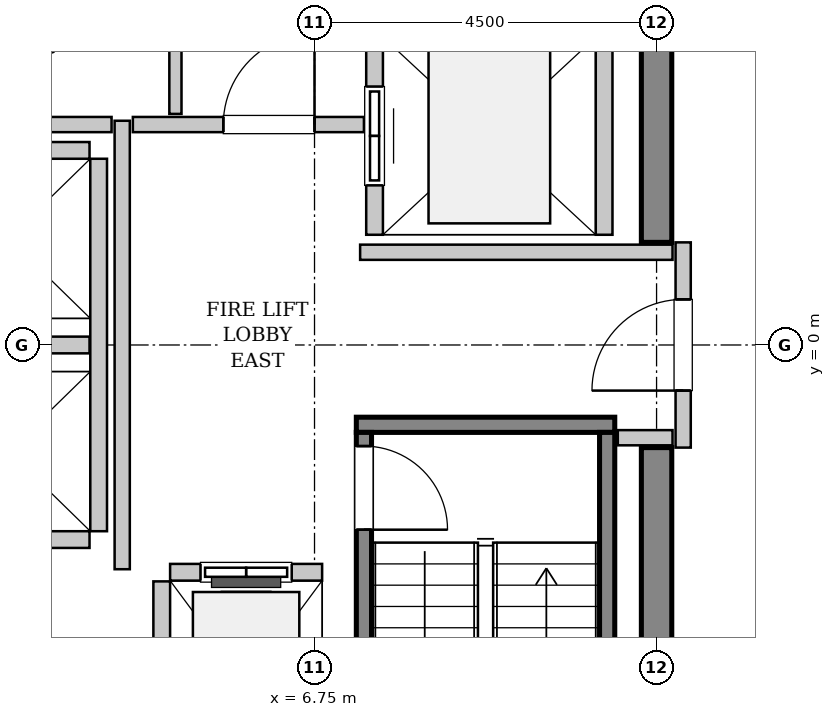
"""IFC4 building model, lengths in metres.
Left out: names, types, materials, properties, quantities, classifications, styles, units other than length and angle.
Written with IfcOpenShell. Run it as: python <this file> out.ifc"""

import sys

from ifc_helpers import new_model, si_unit, direction, frame, frame_2d, origin, place, context, subcontext, project, spatial, rectangle, extrude, source, transform, mapped, element, fill, save


model = new_model("IFC4")
c1 = context("Model", 3, precision=1e-05, world=origin(), true_north=direction((0.0, 1.0)))
c2 = subcontext(c1, "Body", "Model", "MODEL_VIEW")
j1 = project(units=[si_unit("LENGTHUNIT", "METRE"), si_unit("PLANEANGLEUNIT", "RADIAN")], contexts=[c1])
p1 = place(None, origin())
s1 = spatial("IfcSite", under=j1, at=p1, CompositionType="ELEMENT")
p2 = place(p1, origin())
s2 = spatial("IfcBuilding", under=s1, at=p2, CompositionType="ELEMENT")
p3 = place(p2, frame((0.0, 0.0, 330.0)))
s3 = spatial("IfcBuildingStorey", under=s2, at=p3, CompositionType="ELEMENT", Elevation=330.0)
m1 = source(origin(), c2, "Body", "SweptSolid", [
    extrude(rectangle(XDim=7.45, YDim=0.4, at=frame_2d((3.725, 0.0))), origin(), (0.0, 0.0, 1.0), 3.8),
])
for number, where, z_axis, x_axis in (
    (1, (11.25, -8.8, 0.0), (0.0, 0.0, 1.0), (0.0, 1.0, 0.0)),
    (2, (11.25, 1.35, 0.0), (0.0, 0.0, 1.0), (0.0, 1.0, 0.0)),
):
    element("IfcWall", number, at=place(p3, frame(where, z_axis=z_axis, x_axis=x_axis)), inside=s3, PredefinedType="SHEAR", context=c2, shape_type="MappedRepresentation", body=[
        mapped(m1, transform((0.0, 0.0, 0.0), x_axis=(1.0, 0.0, 0.0), y_axis=(0.0, 1.0, 0.0), z_axis=(0.0, 0.0, 1.0), scale=1.0)),
    ])
m2 = source(origin(), c2, "Body", "SweptSolid", [
    extrude(rectangle(XDim=3.4, YDim=0.2, at=frame_2d((1.7, 0.0))), origin(), (0.0, 0.0, 1.0), 3.8),
])
p4 = place(p3, frame((7.3, -1.05, 0.0), z_axis=(0.0, 0.0, 1.0), x_axis=(1.0, 0.0, 0.0)))
e3 = element("IfcWall", 3, at=p4, inside=s3, PredefinedType="SOLIDWALL", context=c2, shape_type="MappedRepresentation", body=[
    mapped(m2, transform((0.0, 0.0, 0.0), x_axis=(1.0, 0.0, 0.0), y_axis=(0.0, 1.0, 0.0), z_axis=(0.0, 0.0, 1.0), scale=1.0)),
])
m3 = source(origin(), c2, "Body", "SweptSolid", [
    extrude(rectangle(XDim=7.1, YDim=0.2, at=frame_2d((3.55, 0.0))), origin(), (0.0, 0.0, 1.0), 3.8),
])
p5 = place(p3, frame((7.4, -1.15, 0.0), z_axis=(0.0, 0.0, 1.0), x_axis=(0.0, -1.0, 0.0)))
e4 = element("IfcWall", 4, at=p5, inside=s3, PredefinedType="SOLIDWALL", context=c2, shape_type="MappedRepresentation", body=[
    mapped(m3, transform((0.0, 0.0, 0.0), x_axis=(1.0, 0.0, 0.0), y_axis=(0.0, 1.0, 0.0), z_axis=(0.0, 0.0, 1.0), scale=1.0)),
])
p6 = place(p5, frame((0.18, 0.0, 0.0)))
e5 = element("IfcOpeningElement", 5, at=p6, cuts=e4, PredefinedType="OPENING", context=c2, shape_type="SweptSolid", body=[
    extrude(rectangle(XDim=1.1, YDim=2.15, at=frame_2d((0.55, 1.075))), frame((0.0, 0.11, 0.0), z_axis=(0.0, -1.0, 0.0), x_axis=(1.0, 0.0, 0.0)), (0.0, 0.0, 1.0), 0.22),
])
p7 = place(p3, frame((10.6, -1.15, 0.0), z_axis=(0.0, 0.0, 1.0), x_axis=(0.0, -1.0, 0.0)))
e6 = element("IfcWall", 6, at=p7, inside=s3, PredefinedType="SOLIDWALL", context=c2, shape_type="MappedRepresentation", body=[
    mapped(m3, transform((0.0, 0.0, 0.0), x_axis=(1.0, 0.0, 0.0), y_axis=(0.0, 1.0, 0.0), z_axis=(0.0, 0.0, 1.0), scale=1.0)),
])
m4 = source(origin(), c2, "Body", "SweptSolid", [
    extrude(rectangle(XDim=2.0, YDim=0.22, at=frame_2d((1.0, 0.0))), origin(), (0.0, 0.0, 1.0), 3.535),
])
p8 = place(p3, frame((6.85, -2.99, 0.0), z_axis=(0.0, 0.0, 1.0), x_axis=(-1.0, 0.0, 0.0)))
e7 = element("IfcWall", 7, at=p8, inside=s3, PredefinedType="SOLIDWALL", context=c2, shape_type="MappedRepresentation", body=[
    mapped(m4, transform((0.0, 0.0, 0.0), x_axis=(1.0, 0.0, 0.0), y_axis=(0.0, 1.0, 0.0), z_axis=(0.0, 0.0, 1.0), scale=1.0)),
])
p9 = place(p8, frame((0.4, 0.0, 0.0)))
e8 = element("IfcOpeningElement", 8, at=p9, cuts=e7, PredefinedType="OPENING", context=c2, shape_type="SweptSolid", body=[
    extrude(rectangle(XDim=1.2, YDim=2.2, at=frame_2d((0.6, 1.1))), frame((0.0, 0.12, 0.0), z_axis=(0.0, -1.0, 0.0), x_axis=(1.0, 0.0, 0.0)), (0.0, 0.0, 1.0), 0.24),
])
m5 = source(origin(), c2, "Body", "SweptSolid", [
    extrude(rectangle(XDim=2.68, YDim=0.22, at=frame_2d((1.34, 0.0))), origin(), (0.0, 0.0, 1.0), 3.535),
])
p10 = place(p3, frame((4.74, -3.11, 0.0), z_axis=(0.0, 0.0, 1.0), x_axis=(0.0, -1.0, 0.0)))
e9 = element("IfcWall", 9, at=p10, inside=s3, PredefinedType="SOLIDWALL", context=c2, shape_type="MappedRepresentation", body=[
    mapped(m5, transform((0.0, 0.0, 0.0), x_axis=(1.0, 0.0, 0.0), y_axis=(0.0, 1.0, 0.0), z_axis=(0.0, 0.0, 1.0), scale=1.0)),
])
m6 = source(origin(), c2, "Body", "SweptSolid", [
    extrude(rectangle(XDim=5.45, YDim=0.22, at=frame_2d((2.725, 0.0))), origin(), (0.0, 0.0, 1.0), 3.535),
])
p11 = place(p3, frame((7.54, 6.9, 0.0), z_axis=(0.0, 0.0, 1.0), x_axis=(0.0, -1.0, 0.0)))
e10 = element("IfcWall", 10, at=p11, inside=s3, PredefinedType="SOLIDWALL", context=c2, shape_type="MappedRepresentation", body=[
    mapped(m6, transform((0.0, 0.0, 0.0), x_axis=(1.0, 0.0, 0.0), y_axis=(0.0, 1.0, 0.0), z_axis=(0.0, 0.0, 1.0), scale=1.0)),
])
p12 = place(p11, frame((3.5, 0.0, 0.0)))
e11 = element("IfcOpeningElement", 11, at=p12, cuts=e10, PredefinedType="OPENING", context=c2, shape_type="SweptSolid", body=[
    extrude(rectangle(XDim=1.3, YDim=2.3, at=frame_2d((0.65, 1.15))), frame((0.0, 0.12, 0.0), z_axis=(0.0, -1.0, 0.0), x_axis=(1.0, 0.0, 0.0)), (0.0, 0.0, 1.0), 0.24),
])
p13 = place(p11, frame((0.65, 0.0, 0.0)))
e12 = element("IfcOpeningElement", 12, at=p13, cuts=e10, PredefinedType="OPENING", context=c2, shape_type="SweptSolid", body=[
    extrude(rectangle(XDim=1.3, YDim=2.3, at=frame_2d((0.65, 1.15))), frame((0.0, 0.12, 0.0), z_axis=(0.0, -1.0, 0.0), x_axis=(1.0, 0.0, 0.0)), (0.0, 0.0, 1.0), 0.24),
])
p14 = place(p3, frame((10.56, 1.45, 0.0), z_axis=(0.0, 0.0, 1.0), x_axis=(0.0, 1.0, 0.0)))
e13 = element("IfcWall", 13, at=p14, inside=s3, PredefinedType="SOLIDWALL", context=c2, shape_type="MappedRepresentation", body=[
    mapped(m6, transform((0.0, 0.0, 0.0), x_axis=(1.0, 0.0, 0.0), y_axis=(0.0, 1.0, 0.0), z_axis=(0.0, 0.0, 1.0), scale=1.0)),
])
m7 = source(origin(), c2, "Body", "SweptSolid", [
    extrude(rectangle(XDim=4.9, YDim=0.22, at=frame_2d((2.45, 0.0))), origin(), (0.0, 0.0, 1.0), 3.535),
])
p15 = place(p3, frame((3.91, -2.45, 0.0), z_axis=(0.0, 0.0, 1.0), x_axis=(0.0, 1.0, 0.0)))
e14 = element("IfcWall", 14, at=p15, inside=s3, PredefinedType="SOLIDWALL", context=c2, shape_type="MappedRepresentation", body=[
    mapped(m7, transform((0.0, 0.0, 0.0), x_axis=(1.0, 0.0, 0.0), y_axis=(0.0, 1.0, 0.0), z_axis=(0.0, 0.0, 1.0), scale=1.0)),
])
m8 = source(origin(), c2, "Body", "SweptSolid", [
    extrude(rectangle(XDim=2.13, YDim=0.22, at=frame_2d((1.065, 0.0))), origin(), (0.0, 0.0, 1.0), 3.535),
])
for number, where, z_axis, x_axis in (
    (15, (1.66, -2.56, 0.0), (0.0, 0.0, 1.0), (1.0, 0.0, 0.0)),
    (16, (1.66, 0.0, 0.0), (0.0, 0.0, 1.0), (1.0, 0.0, 0.0)),
    (17, (3.79, 2.56, 0.0), (0.0, 0.0, 1.0), (-1.0, 0.0, 0.0)),
):
    element("IfcWall", number, at=place(p3, frame(where, z_axis=z_axis, x_axis=x_axis)), inside=s3, PredefinedType="SOLIDWALL", context=c2, shape_type="MappedRepresentation", body=[
        mapped(m8, transform((0.0, 0.0, 0.0), x_axis=(1.0, 0.0, 0.0), y_axis=(0.0, 1.0, 0.0), z_axis=(0.0, 0.0, 1.0), scale=1.0)),
    ])
m9 = source(origin(), c2, "Body", "SweptSolid", [
    extrude(rectangle(XDim=2.7, YDim=0.2, at=frame_2d((1.35, 0.0))), origin(), (0.0, 0.0, 1.0), 2.625),
])
p16 = place(p3, frame((11.6, -1.35, 0.0), z_axis=(0.0, 0.0, 1.0), x_axis=(0.0, 1.0, 0.0)))
e18 = element("IfcWall", 18, at=p16, inside=s3, PredefinedType="PARTITIONING", context=c2, shape_type="MappedRepresentation", body=[
    mapped(m9, transform((0.0, 0.0, 0.0), x_axis=(1.0, 0.0, 0.0), y_axis=(0.0, 1.0, 0.0), z_axis=(0.0, 0.0, 1.0), scale=1.0)),
])
p17 = place(p16, frame((0.75, 0.0, 0.0)))
e19 = element("IfcOpeningElement", 19, at=p17, cuts=e18, PredefinedType="OPENING", context=c2, shape_type="SweptSolid", body=[
    extrude(rectangle(XDim=1.2, YDim=2.15, at=frame_2d((0.6, 1.075))), frame((0.0, 0.11, 0.0), z_axis=(0.0, -1.0, 0.0), x_axis=(1.0, 0.0, 0.0)), (0.0, 0.0, 1.0), 0.22),
])
m10 = source(origin(), c2, "Body", "SweptSolid", [
    extrude(rectangle(XDim=5.9, YDim=0.2, at=frame_2d((2.95, 0.0))), origin(), (0.0, 0.0, 1.0), 3.535),
])
p18 = place(p3, frame((4.22, -2.95, 0.0), z_axis=(0.0, 0.0, 1.0), x_axis=(0.0, 1.0, 0.0)))
e20 = element("IfcWall", 20, at=p18, inside=s3, PredefinedType="PARTITIONING", context=c2, shape_type="MappedRepresentation", body=[
    mapped(m10, transform((0.0, 0.0, 0.0), x_axis=(1.0, 0.0, 0.0), y_axis=(0.0, 1.0, 0.0), z_axis=(0.0, 0.0, 1.0), scale=1.0)),
])
m11 = source(origin(), c2, "Body", "SweptSolid", [
    extrude(rectangle(XDim=2.52, YDim=0.2, at=frame_2d((1.26, 0.0))), origin(), (0.0, 0.0, 1.0), 3.535),
])
p19 = place(p3, frame((1.56, 2.9, 0.0), z_axis=(0.0, 0.0, 1.0), x_axis=(1.0, 0.0, 0.0)))
e21 = element("IfcWall", 21, at=p19, inside=s3, PredefinedType="PARTITIONING", context=c2, shape_type="MappedRepresentation", body=[
    mapped(m11, transform((0.0, 0.0, 0.0), x_axis=(1.0, 0.0, 0.0), y_axis=(0.0, 1.0, 0.0), z_axis=(0.0, 0.0, 1.0), scale=1.0)),
])
m12 = source(origin(), c2, "Body", "SweptSolid", [
    extrude(rectangle(XDim=3.04, YDim=0.2, at=frame_2d((1.52, 0.0))), origin(), (0.0, 0.0, 1.0), 3.535),
])
p20 = place(p3, frame((4.36, 2.9, 0.0), z_axis=(0.0, 0.0, 1.0), x_axis=(1.0, 0.0, 0.0)))
e22 = element("IfcWall", 22, at=p20, inside=s3, PredefinedType="PARTITIONING", context=c2, shape_type="MappedRepresentation", body=[
    mapped(m12, transform((0.0, 0.0, 0.0), x_axis=(1.0, 0.0, 0.0), y_axis=(0.0, 1.0, 0.0), z_axis=(0.0, 0.0, 1.0), scale=1.0)),
])
p21 = place(p20, frame((1.19, 0.0, 0.0)))
e23 = element("IfcOpeningElement", 23, at=p21, cuts=e22, PredefinedType="OPENING", context=c2, shape_type="SweptSolid", body=[
    extrude(rectangle(XDim=1.2, YDim=2.15, at=frame_2d((0.6, 1.075))), frame((0.0, 0.11, 0.0), z_axis=(0.0, -1.0, 0.0), x_axis=(1.0, 0.0, 0.0)), (0.0, 0.0, 1.0), 0.22),
])
m13 = source(origin(), c2, "Body", "SweptSolid", [
    extrude(rectangle(XDim=4.11, YDim=0.2, at=frame_2d((2.055, 0.0))), origin(), (0.0, 0.0, 1.0), 3.535),
])
p22 = place(p3, frame((7.35, 1.22, 0.0), z_axis=(0.0, 0.0, 1.0), x_axis=(1.0, 0.0, 0.0)))
e24 = element("IfcWall", 24, at=p22, inside=s3, PredefinedType="PARTITIONING", context=c2, shape_type="MappedRepresentation", body=[
    mapped(m13, transform((0.0, 0.0, 0.0), x_axis=(1.0, 0.0, 0.0), y_axis=(0.0, 1.0, 0.0), z_axis=(0.0, 0.0, 1.0), scale=1.0)),
])
m14 = source(origin(), c2, "Body", "SweptSolid", [
    extrude(rectangle(XDim=0.72, YDim=0.2, at=frame_2d((0.36, 0.0))), origin(), (0.0, 0.0, 1.0), 3.535),
])
p23 = place(p3, frame((10.74, -1.22, 0.0), z_axis=(0.0, 0.0, 1.0), x_axis=(1.0, 0.0, 0.0)))
e25 = element("IfcWall", 25, at=p23, inside=s3, PredefinedType="PARTITIONING", context=c2, shape_type="MappedRepresentation", body=[
    mapped(m14, transform((0.0, 0.0, 0.0), x_axis=(1.0, 0.0, 0.0), y_axis=(0.0, 1.0, 0.0), z_axis=(0.0, 0.0, 1.0), scale=1.0)),
])
m15 = source(origin(), c2, "Body", "SweptSolid", [
    extrude(rectangle(XDim=5.45, YDim=0.16, at=frame_2d((2.725, 0.0))), origin(), (0.0, 0.0, 1.0), 3.535),
])
p24 = place(p3, frame((4.92, 3.04, 0.0), z_axis=(0.0, 0.0, 1.0), x_axis=(0.0, 1.0, 0.0)))
e26 = element("IfcWall", 26, at=p24, inside=s3, PredefinedType="PARTITIONING", context=c2, shape_type="MappedRepresentation", body=[
    mapped(m15, transform((0.0, 0.0, 0.0), x_axis=(1.0, 0.0, 0.0), y_axis=(0.0, 1.0, 0.0), z_axis=(0.0, 0.0, 1.0), scale=1.0)),
])
m16 = source(origin(), c2, "Body", "SweptSolid", [
    extrude(rectangle(XDim=1.1, YDim=2.15, at=frame_2d((0.55, 1.075))), frame((0.0, 0.025, 0.0), z_axis=(0.0, -1.0, 0.0), x_axis=(1.0, 0.0, 0.0)), (0.0, 0.0, 1.0), 0.05),
])
p25 = place(p6, origin())
e27 = element("IfcDoor", 27, at=p25, inside=s3, OperationType="SINGLE_SWING_RIGHT", PredefinedType="DOOR", context=c2, shape_type="MappedRepresentation", body=[
    mapped(m16, transform((0.0, 0.0, 0.0), x_axis=(1.0, 0.0, 0.0), y_axis=(0.0, 1.0, 0.0), z_axis=(0.0, 0.0, 1.0), scale=1.0)),
])
fill(e5, e27)
m17 = source(origin(), c2, "Body", "SweptSolid", [
    extrude(rectangle(XDim=1.2, YDim=2.2, at=frame_2d((0.6, 1.1))), frame((0.0, 0.025, 0.0), z_axis=(0.0, -1.0, 0.0), x_axis=(1.0, 0.0, 0.0)), (0.0, 0.0, 1.0), 0.05),
])
p26 = place(p9, origin())
e28 = element("IfcDoor", 28, at=p26, inside=s3, OperationType="SLIDING_TO_LEFT", PredefinedType="DOOR", context=c2, shape_type="MappedRepresentation", body=[
    mapped(m17, transform((0.0, 0.0, 0.0), x_axis=(1.0, 0.0, 0.0), y_axis=(0.0, 1.0, 0.0), z_axis=(0.0, 0.0, 1.0), scale=1.0)),
])
fill(e8, e28)
m18 = source(origin(), c2, "Body", "SweptSolid", [
    extrude(rectangle(XDim=1.3, YDim=2.3, at=frame_2d((0.65, 1.15))), frame((0.0, 0.025, 0.0), z_axis=(0.0, -1.0, 0.0), x_axis=(1.0, 0.0, 0.0)), (0.0, 0.0, 1.0), 0.05),
])
p27 = place(p12, origin())
e29 = element("IfcDoor", 29, at=p27, inside=s3, OperationType="SLIDING_TO_RIGHT", PredefinedType="DOOR", context=c2, shape_type="MappedRepresentation", body=[
    mapped(m18, transform((0.0, 0.0, 0.0), x_axis=(1.0, 0.0, 0.0), y_axis=(0.0, 1.0, 0.0), z_axis=(0.0, 0.0, 1.0), scale=1.0)),
])
fill(e11, e29)
m19 = source(origin(), c2, "Body", "SweptSolid", [
    extrude(rectangle(XDim=1.2, YDim=2.15, at=frame_2d((0.6, 1.075))), frame((0.0, 0.025, 0.0), z_axis=(0.0, -1.0, 0.0), x_axis=(1.0, 0.0, 0.0)), (0.0, 0.0, 1.0), 0.05),
])
p28 = place(p17, origin())
e30 = element("IfcDoor", 30, at=p28, inside=s3, OperationType="SINGLE_SWING_LEFT", PredefinedType="DOOR", context=c2, shape_type="MappedRepresentation", body=[
    mapped(m19, transform((0.0, 0.0, 0.0), x_axis=(1.0, 0.0, 0.0), y_axis=(0.0, 1.0, 0.0), z_axis=(0.0, 0.0, 1.0), scale=1.0)),
])
fill(e19, e30)
p29 = place(p21, origin())
e31 = element("IfcDoor", 31, at=p29, inside=s3, OperationType="SINGLE_SWING_RIGHT", PredefinedType="DOOR", context=c2, shape_type="MappedRepresentation", body=[
    mapped(m19, transform((0.0, 0.0, 0.0), x_axis=(1.0, 0.0, 0.0), y_axis=(0.0, 1.0, 0.0), z_axis=(0.0, 0.0, 1.0), scale=1.0)),
])
fill(e23, e31)
save(model, sys.argv[1])
